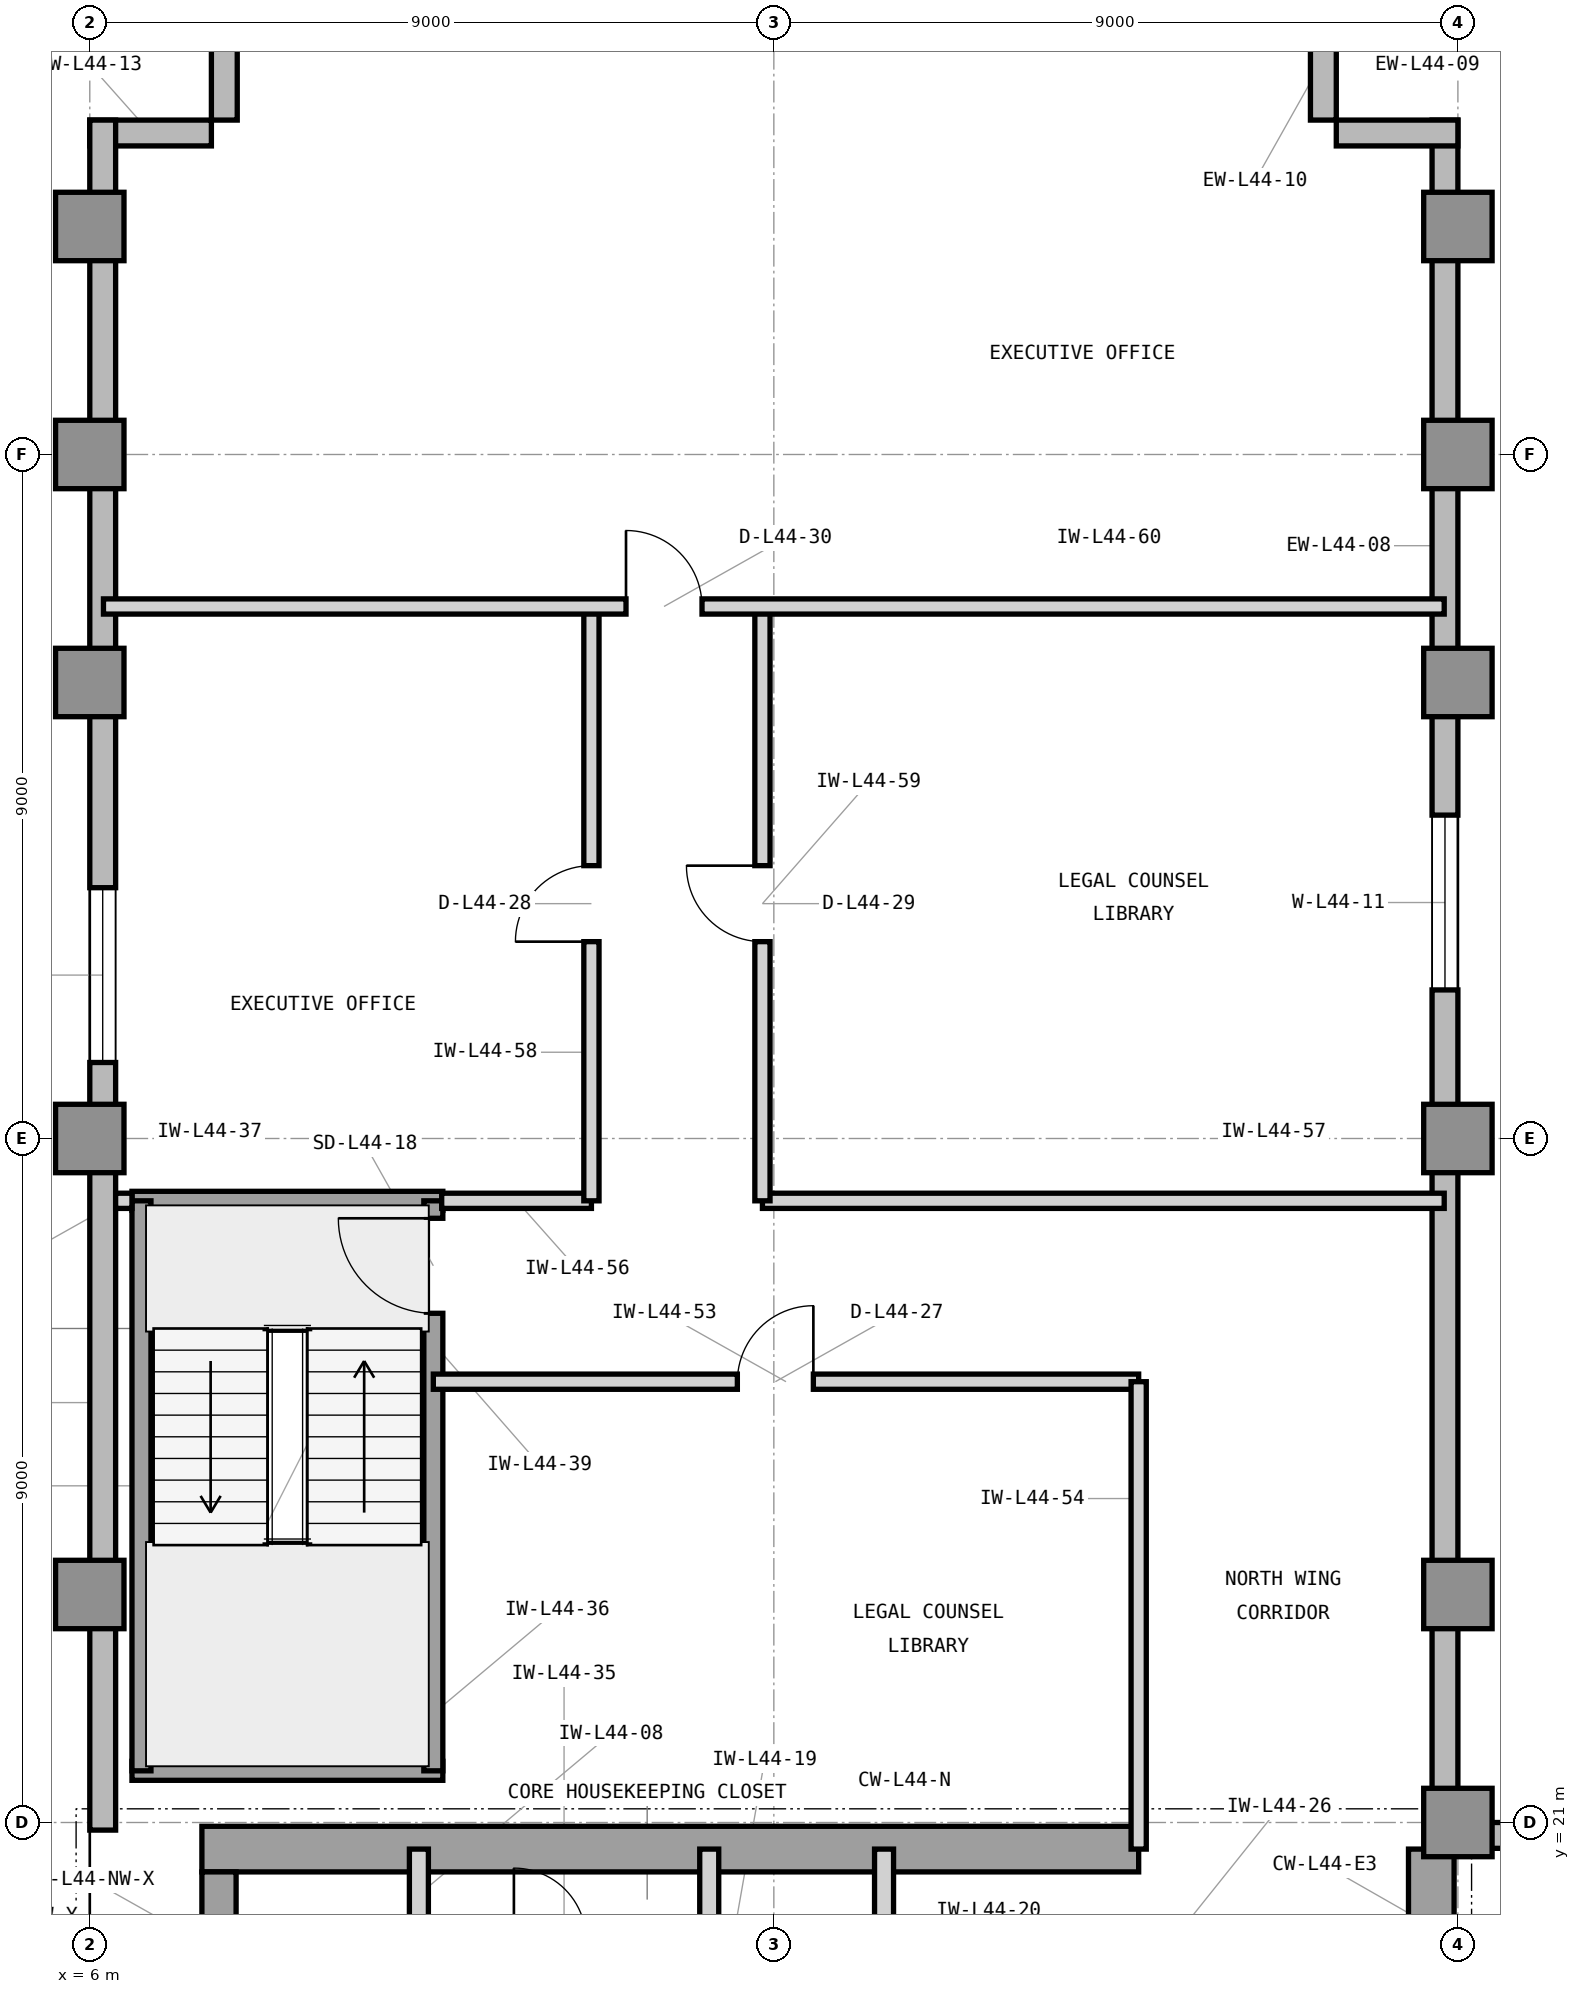
"""IFC4 building model, lengths in metres.
Left out: names, types, materials, properties, quantities, classifications, styles, units other than length and angle.
Written with IfcOpenShell. Run it as: python <this file> out.ifc"""

import sys

from ifc_helpers import new_model, si_unit, direction, frame, frame_2d, origin, origin_2d, place, context, subcontext, project, spatial, rectangle, extrude, element, fill, save


model = new_model("IFC4")
c1 = context("Model", 3, precision=1e-05, world=origin(), true_north=direction((0.0, 1.0)))
c2 = subcontext(c1, "Body", "Model", "MODEL_VIEW")
j1 = project(units=[si_unit("LENGTHUNIT", "METRE"), si_unit("PLANEANGLEUNIT", "RADIAN")], contexts=[c1])
p1 = place(None, origin())
s1 = spatial("IfcSite", under=j1, at=p1, CompositionType="ELEMENT")
p2 = place(p1, origin())
s2 = spatial("IfcBuilding", under=s1, at=p2, CompositionType="ELEMENT")
p3 = place(p2, frame((0.0, 0.0, 183.9)))
s3 = spatial("IfcBuildingStorey", under=s2, at=p3, CompositionType="ELEMENT", Elevation=183.9)
p4 = place(p3, frame((7.475, 20.65, 0.0), z_axis=(0.0, 0.0, 1.0), x_axis=(1.0, 0.0, 0.0)))
e1 = element("IfcWall", 1, at=p4, inside=s3, PredefinedType="SHEAR", context=c2, shape_type="SweptSolid", body=[
    extrude(rectangle(XDim=12.325, YDim=0.6, at=frame_2d((6.163, 0.0))), origin(), (0.0, 0.0, 1.0), 3.9),
])
p5 = place(p3, frame((23.65, 16.6, 0.0), z_axis=(0.0, 0.0, 1.0), x_axis=(0.0, 1.0, 0.0)))
e2 = element("IfcWall", 2, at=p5, inside=s3, PredefinedType="SHEAR", context=c2, shape_type="SweptSolid", body=[
    extrude(rectangle(XDim=4.05, YDim=0.6, at=frame_2d((2.025, 0.0))), origin(), (0.0, 0.0, 1.0), 3.9),
])
p6 = place(p3, frame((7.7, 19.575, 0.0), z_axis=(0.0, 0.0, 1.0), x_axis=(0.0, 1.0, 0.0)))
e3 = element("IfcWall", 3, at=p6, inside=s3, PredefinedType="SHEAR", context=c2, shape_type="SweptSolid", body=[
    extrude(rectangle(XDim=0.775, YDim=0.45, at=frame_2d((0.388, 0.0))), origin(), (0.0, 0.0, 1.0), 3.9),
])
for number, where, z_axis, x_axis in (
    (4, (24.0, 21.0, 0.0), (0.0, 0.0, 1.0), (1.0, 0.0, 0.0)),
    (5, (6.0, 24.0, 0.0), (0.0, 0.0, 1.0), (1.0, 0.0, 0.0)),
    (6, (24.0, 24.0, 0.0), (0.0, 0.0, 1.0), (1.0, 0.0, 0.0)),
    (7, (6.0, 30.0, 0.0), (0.0, 0.0, 1.0), (1.0, 0.0, 0.0)),
    (8, (24.0, 30.0, 0.0), (0.0, 0.0, 1.0), (1.0, 0.0, 0.0)),
    (9, (6.0, 36.0, 0.0), (0.0, 0.0, 1.0), (1.0, 0.0, 0.0)),
    (10, (24.0, 36.0, 0.0), (0.0, 0.0, 1.0), (1.0, 0.0, 0.0)),
    (11, (6.0, 39.0, 0.0), (0.0, 0.0, 1.0), (1.0, 0.0, 0.0)),
    (12, (24.0, 39.0, 0.0), (0.0, 0.0, 1.0), (1.0, 0.0, 0.0)),
    (13, (6.0, 42.0, 0.0), (0.0, 0.0, 1.0), (1.0, 0.0, 0.0)),
    (14, (24.0, 42.0, 0.0), (0.0, 0.0, 1.0), (1.0, 0.0, 0.0)),
):
    element("IfcColumn", number, at=place(p3, frame(where, z_axis=z_axis, x_axis=x_axis)), inside=s3, PredefinedType="COLUMN", context=c2, shape_type="SweptSolid", body=[
        extrude(rectangle(XDim=0.9, YDim=0.9, at=origin_2d()), origin(), (0.0, 0.0, 1.0), 3.9),
    ])
p7 = place(p3, frame((55.4, 20.83, 0.0), z_axis=(0.0, 0.0, 1.0), x_axis=(-1.0, 0.0, 0.0)))
e15 = element("IfcWall", 15, at=p7, inside=s3, PredefinedType="STANDARD", context=c2, shape_type="SweptSolid", body=[
    extrude(rectangle(XDim=31.4, YDim=0.34, at=frame_2d((15.7, 0.0))), origin(), (0.0, 0.0, 1.0), 3.7),
])
p8 = place(p7, frame((29.046, 0.0, 0.9)))
e16 = element("IfcOpeningElement", 16, at=p8, cuts=e15, PredefinedType="OPENING", context=c2, shape_type="SweptSolid", body=[
    extrude(rectangle(XDim=1.6, YDim=2.2, at=frame_2d((0.8, 1.1))), frame((0.0, 0.18, 0.0), z_axis=(0.0, -1.0, 0.0), x_axis=(1.0, 0.0, 0.0)), (0.0, 0.0, 1.0), 0.36),
])
p9 = place(p7, frame((10.125, 0.0, 0.9)))
e17 = element("IfcOpeningElement", 17, at=p9, cuts=e15, PredefinedType="OPENING", context=c2, shape_type="SweptSolid", body=[
    extrude(rectangle(XDim=2.3, YDim=2.2, at=frame_2d((1.15, 1.1))), frame((0.0, 0.18, 0.0), z_axis=(0.0, -1.0, 0.0), x_axis=(1.0, 0.0, 0.0)), (0.0, 0.0, 1.0), 0.36),
])
p10 = place(p3, frame((23.83, 21.0, 0.0), z_axis=(0.0, 0.0, 1.0), x_axis=(0.0, 1.0, 0.0)))
e18 = element("IfcWall", 18, at=p10, inside=s3, PredefinedType="STANDARD", context=c2, shape_type="SweptSolid", body=[
    extrude(rectangle(XDim=22.4, YDim=0.34, at=frame_2d((11.2, 0.0))), origin(), (0.0, 0.0, 1.0), 3.7),
])
p11 = place(p10, frame((10.955, 0.0, 0.9)))
e19 = element("IfcOpeningElement", 19, at=p11, cuts=e18, PredefinedType="OPENING", context=c2, shape_type="SweptSolid", body=[
    extrude(rectangle(XDim=2.3, YDim=2.2, at=frame_2d((1.15, 1.1))), frame((0.0, 0.18, 0.0), z_axis=(0.0, -1.0, 0.0), x_axis=(1.0, 0.0, 0.0)), (0.0, 0.0, 1.0), 0.36),
])
for number, where, z_axis, x_axis in (
    (20, (24.0, 43.23, 0.0), (0.0, 0.0, 1.0), (-1.0, 0.0, 0.0)),
    (21, (22.23, 43.4, 0.0), (0.0, 0.0, 1.0), (0.0, 1.0, 0.0)),
    (22, (7.77, 45.0, 0.0), (0.0, 0.0, 1.0), (0.0, -1.0, 0.0)),
    (23, (7.6, 43.23, 0.0), (0.0, 0.0, 1.0), (-1.0, 0.0, 0.0)),
):
    element("IfcWall", number, at=place(p3, frame(where, z_axis=z_axis, x_axis=x_axis)), inside=s3, PredefinedType="STANDARD", context=c2, shape_type="SweptSolid", body=[
        extrude(rectangle(XDim=1.6, YDim=0.34, at=frame_2d((0.8, 0.0))), origin(), (0.0, 0.0, 1.0), 3.7),
    ])
p12 = place(p3, frame((6.17, 43.4, 0.0), z_axis=(0.0, 0.0, 1.0), x_axis=(0.0, -1.0, 0.0)))
e24 = element("IfcWall", 24, at=p12, inside=s3, PredefinedType="STANDARD", context=c2, shape_type="SweptSolid", body=[
    extrude(rectangle(XDim=22.5, YDim=0.34, at=frame_2d((11.25, 0.0))), origin(), (0.0, 0.0, 1.0), 3.7),
])
p13 = place(p12, frame((10.1, 0.0, 0.9)))
e25 = element("IfcOpeningElement", 25, at=p13, cuts=e24, PredefinedType="OPENING", context=c2, shape_type="SweptSolid", body=[
    extrude(rectangle(XDim=2.3, YDim=2.2, at=frame_2d((1.15, 1.1))), frame((0.0, 0.18, 0.0), z_axis=(0.0, -1.0, 0.0), x_axis=(1.0, 0.0, 0.0)), (0.0, 0.0, 1.0), 0.36),
])
p14 = place(p3, frame((10.33, 19.45, 0.0), z_axis=(0.0, 0.0, 1.0), x_axis=(0.0, 1.0, 0.0)))
e26 = element("IfcWall", 26, at=p14, inside=s3, PredefinedType="PARTITIONING", context=c2, shape_type="SweptSolid", body=[
    extrude(rectangle(XDim=1.2, YDim=0.25, at=frame_2d((0.6, 0.0))), origin(), (0.0, 0.0, 1.0), 3.073),
])
for number, where, z_axis, x_axis in (
    (27, (14.15, 16.7, 0.0), (0.0, 0.0, 1.0), (0.0, 1.0, 0.0)),
    (28, (16.45, 16.7, 0.0), (0.0, 0.0, 1.0), (0.0, 1.0, 0.0)),
):
    element("IfcWall", number, at=place(p3, frame(where, z_axis=z_axis, x_axis=x_axis)), inside=s3, PredefinedType="PARTITIONING", context=c2, shape_type="SweptSolid", body=[
        extrude(rectangle(XDim=3.95, YDim=0.25, at=frame_2d((1.975, 0.0))), origin(), (0.0, 0.0, 1.0), 3.69),
    ])
for number, where, z_axis, x_axis in (
    (29, (6.555, 21.68, 0.0), (0.0, 0.0, 1.0), (1.0, 0.0, 0.0)),
    (30, (6.555, 29.18, 0.0), (0.0, 0.0, 1.0), (1.0, 0.0, 0.0)),
):
    element("IfcWall", number, at=place(p3, frame(where, z_axis=z_axis, x_axis=x_axis)), inside=s3, PredefinedType="SHEAR", context=c2, shape_type="SweptSolid", body=[
        extrude(rectangle(XDim=4.09, YDim=0.25, at=frame_2d((2.045, 0.0))), origin(), (0.0, 0.0, 1.0), 3.9),
    ])
p15 = place(p3, frame((6.68, 21.68, 0.0), z_axis=(0.0, 0.0, 1.0), x_axis=(0.0, 1.0, 0.0)))
e31 = element("IfcWall", 31, at=p15, inside=s3, PredefinedType="SHEAR", context=c2, shape_type="SweptSolid", body=[
    extrude(rectangle(XDim=7.5, YDim=0.25, at=frame_2d((3.75, 0.0))), origin(), (0.0, 0.0, 1.0), 3.9),
])
p16 = place(p3, frame((10.52, 21.68, 0.0), z_axis=(0.0, 0.0, 1.0), x_axis=(0.0, 1.0, 0.0)))
e32 = element("IfcWall", 32, at=p16, inside=s3, PredefinedType="SHEAR", context=c2, shape_type="SweptSolid", body=[
    extrude(rectangle(XDim=7.5, YDim=0.25, at=frame_2d((3.75, 0.0))), origin(), (0.0, 0.0, 1.0), 3.9),
])
p17 = place(p16, frame((6.02, 0.0, 0.0)))
e33 = element("IfcOpeningElement", 33, at=p17, cuts=e32, PredefinedType="OPENING", context=c2, shape_type="SweptSolid", body=[
    extrude(rectangle(XDim=1.25, YDim=2.2, at=frame_2d((0.625, 1.1))), frame((0.0, 0.135, 0.0), z_axis=(0.0, -1.0, 0.0), x_axis=(1.0, 0.0, 0.0)), (0.0, 0.0, 1.0), 0.27),
])
p18 = place(p3, frame((10.52, 26.8, 0.0), z_axis=(0.0, 0.0, 1.0), x_axis=(1.0, 0.0, 0.0)))
e34 = element("IfcWall", 34, at=p18, inside=s3, PredefinedType="PARTITIONING", context=c2, shape_type="SweptSolid", body=[
    extrude(rectangle(XDim=9.28, YDim=0.2, at=frame_2d((4.64, 0.0))), origin(), (0.0, 0.0, 1.0), 3.69),
])
p19 = place(p18, frame((4.0, 0.0, 0.0)))
e35 = element("IfcOpeningElement", 35, at=p19, cuts=e34, PredefinedType="OPENING", context=c2, shape_type="SweptSolid", body=[
    extrude(rectangle(XDim=1.0, YDim=2.15, at=frame_2d((0.5, 1.075))), frame((0.0, 0.11, 0.0), z_axis=(0.0, -1.0, 0.0), x_axis=(1.0, 0.0, 0.0)), (0.0, 0.0, 1.0), 0.22),
])
p20 = place(p3, frame((19.8, 20.65, 0.0), z_axis=(0.0, 0.0, 1.0), x_axis=(0.0, 1.0, 0.0)))
e36 = element("IfcWall", 36, at=p20, inside=s3, PredefinedType="PARTITIONING", context=c2, shape_type="SweptSolid", body=[
    extrude(rectangle(XDim=6.15, YDim=0.2, at=frame_2d((3.075, 0.0))), origin(), (0.0, 0.0, 1.0), 3.69),
])
p21 = place(p3, frame((6.34, 29.18, 0.0), z_axis=(0.0, 0.0, 1.0), x_axis=(1.0, 0.0, 0.0)))
e37 = element("IfcWall", 37, at=p21, inside=s3, PredefinedType="PARTITIONING", context=c2, shape_type="SweptSolid", body=[
    extrude(rectangle(XDim=0.215, YDim=0.2, at=frame_2d((0.107, 0.0))), origin(), (0.0, 0.0, 1.0), 3.69),
])
p22 = place(p3, frame((10.63, 29.18, 0.0), z_axis=(0.0, 0.0, 1.0), x_axis=(1.0, 0.0, 0.0)))
e38 = element("IfcWall", 38, at=p22, inside=s3, PredefinedType="PARTITIONING", context=c2, shape_type="SweptSolid", body=[
    extrude(rectangle(XDim=1.97, YDim=0.2, at=frame_2d((0.985, 0.0))), origin(), (0.0, 0.0, 1.0), 3.69),
])
p23 = place(p3, frame((14.85, 29.18, 0.0), z_axis=(0.0, 0.0, 1.0), x_axis=(1.0, 0.0, 0.0)))
e39 = element("IfcWall", 39, at=p23, inside=s3, PredefinedType="PARTITIONING", context=c2, shape_type="SweptSolid", body=[
    extrude(rectangle(XDim=8.97, YDim=0.2, at=frame_2d((4.485, 0.0))), origin(), (0.0, 0.0, 1.0), 3.69),
])
p24 = place(p3, frame((12.6, 29.18, 0.0), z_axis=(0.0, 0.0, 1.0), x_axis=(0.0, 1.0, 0.0)))
e40 = element("IfcWall", 40, at=p24, inside=s3, PredefinedType="PARTITIONING", context=c2, shape_type="SweptSolid", body=[
    extrude(rectangle(XDim=7.82, YDim=0.2, at=frame_2d((3.91, 0.0))), origin(), (0.0, 0.0, 1.0), 3.69),
])
p25 = place(p24, frame((3.41, 0.0, 0.0)))
e41 = element("IfcOpeningElement", 41, at=p25, cuts=e40, PredefinedType="OPENING", context=c2, shape_type="SweptSolid", body=[
    extrude(rectangle(XDim=1.0, YDim=2.15, at=frame_2d((0.5, 1.075))), frame((0.0, 0.11, 0.0), z_axis=(0.0, -1.0, 0.0), x_axis=(1.0, 0.0, 0.0)), (0.0, 0.0, 1.0), 0.22),
])
p26 = place(p3, frame((14.85, 29.18, 0.0), z_axis=(0.0, 0.0, 1.0), x_axis=(0.0, 1.0, 0.0)))
e42 = element("IfcWall", 42, at=p26, inside=s3, PredefinedType="PARTITIONING", context=c2, shape_type="SweptSolid", body=[
    extrude(rectangle(XDim=7.82, YDim=0.2, at=frame_2d((3.91, 0.0))), origin(), (0.0, 0.0, 1.0), 3.69),
])
p27 = place(p26, frame((3.41, 0.0, 0.0)))
e43 = element("IfcOpeningElement", 43, at=p27, cuts=e42, PredefinedType="OPENING", context=c2, shape_type="SweptSolid", body=[
    extrude(rectangle(XDim=1.0, YDim=2.15, at=frame_2d((0.5, 1.075))), frame((0.0, 0.11, 0.0), z_axis=(0.0, -1.0, 0.0), x_axis=(1.0, 0.0, 0.0)), (0.0, 0.0, 1.0), 0.22),
])
p28 = place(p3, frame((6.18, 37.0, 0.0), z_axis=(0.0, 0.0, 1.0), x_axis=(1.0, 0.0, 0.0)))
e44 = element("IfcWall", 44, at=p28, inside=s3, PredefinedType="PARTITIONING", context=c2, shape_type="SweptSolid", body=[
    extrude(rectangle(XDim=17.64, YDim=0.2, at=frame_2d((8.82, 0.0))), origin(), (0.0, 0.0, 1.0), 3.69),
])
p29 = place(p28, frame((6.875, 0.0, 0.0)))
e45 = element("IfcOpeningElement", 45, at=p29, cuts=e44, PredefinedType="OPENING", context=c2, shape_type="SweptSolid", body=[
    extrude(rectangle(XDim=1.0, YDim=2.15, at=frame_2d((0.5, 1.075))), frame((0.0, 0.11, 0.0), z_axis=(0.0, -1.0, 0.0), x_axis=(1.0, 0.0, 0.0)), (0.0, 0.0, 1.0), 0.22),
])
p30 = place(p13, origin())
e46 = element("IfcWindow", 46, at=p30, inside=s3, PartitioningType="SINGLE_PANEL", PredefinedType="WINDOW", context=c2, shape_type="SweptSolid", body=[
    extrude(rectangle(XDim=2.3, YDim=2.2, at=frame_2d((1.15, 1.1))), frame((0.0, 0.11, 0.0), z_axis=(0.0, -1.0, 0.0), x_axis=(1.0, 0.0, 0.0)), (0.0, 0.0, 1.0), 0.06),
])
fill(e25, e46)
p31 = place(p17, origin())
e47 = element("IfcDoor", 47, at=p31, inside=s3, OperationType="SINGLE_SWING_RIGHT", PredefinedType="DOOR", context=c2, shape_type="SweptSolid", body=[
    extrude(rectangle(XDim=1.25, YDim=2.2, at=frame_2d((0.625, 1.1))), frame((0.0, 0.025, 0.0), z_axis=(0.0, -1.0, 0.0), x_axis=(1.0, 0.0, 0.0)), (0.0, 0.0, 1.0), 0.05),
])
fill(e33, e47)
p32 = place(p19, origin())
e48 = element("IfcDoor", 48, at=p32, inside=s3, OperationType="SINGLE_SWING_RIGHT", PredefinedType="DOOR", context=c2, shape_type="SweptSolid", body=[
    extrude(rectangle(XDim=1.0, YDim=2.15, at=frame_2d((0.5, 1.075))), frame((0.0, 0.025, 0.0), z_axis=(0.0, -1.0, 0.0), x_axis=(1.0, 0.0, 0.0)), (0.0, 0.0, 1.0), 0.05),
])
fill(e35, e48)
p33 = place(p25, origin())
e49 = element("IfcDoor", 49, at=p33, inside=s3, OperationType="SINGLE_SWING_LEFT", PredefinedType="DOOR", context=c2, shape_type="SweptSolid", body=[
    extrude(rectangle(XDim=1.0, YDim=2.15, at=frame_2d((0.5, 1.075))), frame((0.0, 0.025, 0.0), z_axis=(0.0, -1.0, 0.0), x_axis=(1.0, 0.0, 0.0)), (0.0, 0.0, 1.0), 0.05),
])
fill(e41, e49)
p34 = place(p27, origin())
e50 = element("IfcDoor", 50, at=p34, inside=s3, OperationType="SINGLE_SWING_RIGHT", PredefinedType="DOOR", context=c2, shape_type="SweptSolid", body=[
    extrude(rectangle(XDim=1.0, YDim=2.15, at=frame_2d((0.5, 1.075))), frame((0.0, 0.025, 0.0), z_axis=(0.0, -1.0, 0.0), x_axis=(1.0, 0.0, 0.0)), (0.0, 0.0, 1.0), 0.05),
])
fill(e43, e50)
p35 = place(p29, origin())
e51 = element("IfcDoor", 51, at=p35, inside=s3, OperationType="SINGLE_SWING_LEFT", PredefinedType="DOOR", context=c2, shape_type="SweptSolid", body=[
    extrude(rectangle(XDim=1.0, YDim=2.15, at=frame_2d((0.5, 1.075))), frame((0.0, 0.025, 0.0), z_axis=(0.0, -1.0, 0.0), x_axis=(1.0, 0.0, 0.0)), (0.0, 0.0, 1.0), 0.05),
])
fill(e45, e51)
p36 = place(p11, origin())
e52 = element("IfcWindow", 52, at=p36, inside=s3, PartitioningType="SINGLE_PANEL", PredefinedType="WINDOW", context=c2, shape_type="SweptSolid", body=[
    extrude(rectangle(XDim=2.3, YDim=2.2, at=frame_2d((1.15, 1.1))), frame((0.0, 0.11, 0.0), z_axis=(0.0, -1.0, 0.0), x_axis=(1.0, 0.0, 0.0)), (0.0, 0.0, 1.0), 0.06),
])
fill(e19, e52)
save(model, sys.argv[1])
